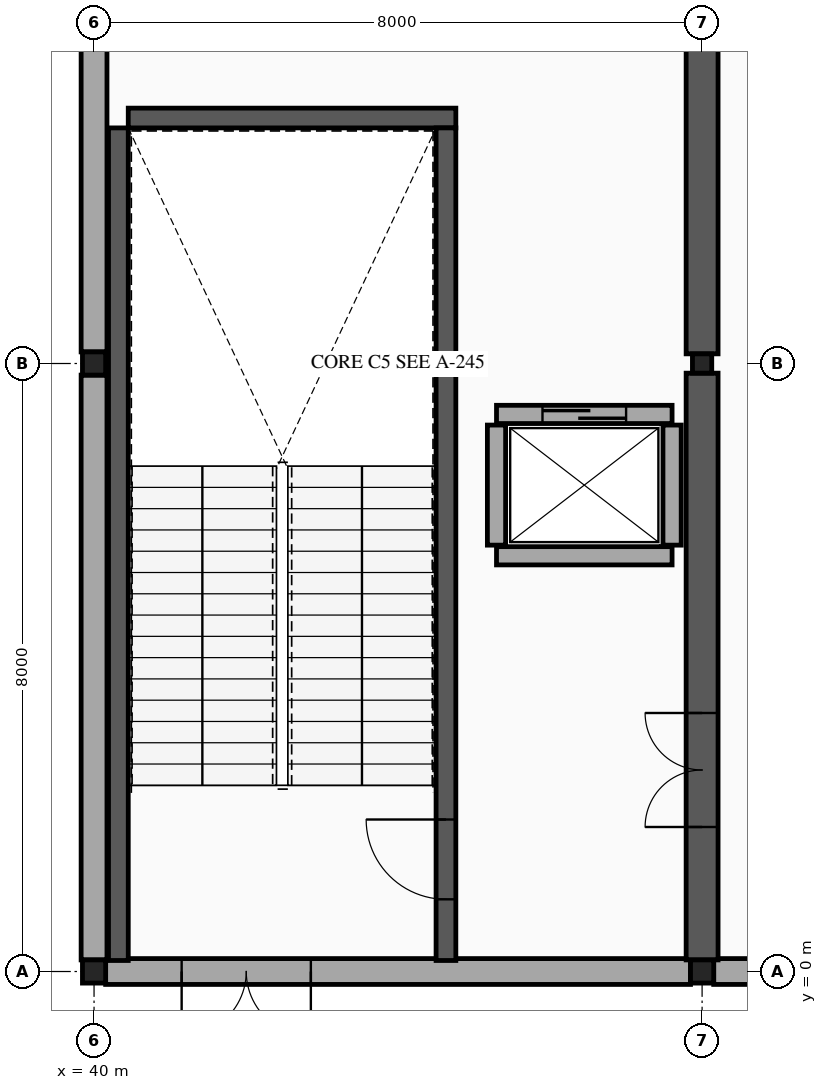
"""IFC4 building model, lengths in metres.
Left out: names, types, materials, properties, quantities, classifications, styles, units other than length and angle.
Written with IfcOpenShell. Run it as: python <this file> out.ifc"""

import sys

from ifc_helpers import new_model, si_unit, direction, frame, frame_2d, origin, origin_2d, place, context, subcontext, project, spatial, rectangle, hollow_rectangle, extrude, element, fill, save


model = new_model("IFC4")
c1 = context("Model", 3, precision=1e-05, world=origin(), true_north=direction((0.0, 1.0)))
c2 = subcontext(c1, "Body", "Model", "MODEL_VIEW")
j1 = project(units=[si_unit("LENGTHUNIT", "METRE"), si_unit("PLANEANGLEUNIT", "RADIAN")], contexts=[c1])
p1 = place(None, origin())
s1 = spatial("IfcSite", under=j1, at=p1, CompositionType="ELEMENT")
p2 = place(p1, origin())
s2 = spatial("IfcBuilding", under=s1, at=p2, CompositionType="ELEMENT")
p3 = place(p2, origin())
s3 = spatial("IfcBuildingStorey", under=s2, at=p3, CompositionType="ELEMENT", Elevation=0.0)
for number, where, z_axis, x_axis in (
    (1, (40.0, 0.0, 0.0), (0.0, 0.0, 1.0), (1.0, 0.0, 0.0)),
    (2, (40.0, 8.0, 0.0), (0.0, 0.0, 1.0), (1.0, 0.0, 0.0)),
    (3, (48.0, 0.0, 0.0), (0.0, 0.0, 1.0), (1.0, 0.0, 0.0)),
):
    element("IfcColumn", number, at=place(p3, frame(where, z_axis=z_axis, x_axis=x_axis)), inside=s3, PredefinedType="COLUMN", context=c2, shape_type="SweptSolid", body=[
        extrude(hollow_rectangle(XDim=0.305, YDim=0.305, WallThickness=0.012, InnerFilletRadius=0.012, OuterFilletRadius=0.024, at=origin_2d()), origin(), (0.0, 0.0, 1.0), 5.6),
    ])
p4 = place(p3, frame((48.0, 8.0, 0.0), z_axis=(0.0, 0.0, 1.0), x_axis=(1.0, 0.0, 0.0)))
e4 = element("IfcColumn", 4, at=p4, inside=s3, PredefinedType="COLUMN", context=c2, shape_type="SweptSolid", body=[
    extrude(hollow_rectangle(XDim=0.254, YDim=0.254, WallThickness=0.009, InnerFilletRadius=0.009, OuterFilletRadius=0.018, at=origin_2d()), origin(), (0.0, 0.0, 1.0), 5.6),
])
p5 = place(p3, frame((55.847, 0.0, 0.0), z_axis=(0.0, 0.0, 1.0), x_axis=(-1.0, 0.0, 0.0)))
e5 = element("IfcWall", 5, at=p5, inside=s3, PredefinedType="STANDARD", context=c2, shape_type="SweptSolid", body=[
    extrude(rectangle(XDim=7.695, YDim=0.34, at=frame_2d((3.847, 0.0))), origin(), (0.0, 0.0, 1.0), 4.58),
])
p6 = place(p3, frame((47.847, 0.0, 0.0), z_axis=(0.0, 0.0, 1.0), x_axis=(-1.0, 0.0, 0.0)))
e6 = element("IfcWall", 6, at=p6, inside=s3, PredefinedType="STANDARD", context=c2, shape_type="SweptSolid", body=[
    extrude(rectangle(XDim=7.695, YDim=0.34, at=frame_2d((3.847, 0.0))), origin(), (0.0, 0.0, 1.0), 4.58),
])
p7 = place(p6, frame((4.995, 0.0, 0.0)))
e7 = element("IfcOpeningElement", 7, at=p7, cuts=e6, PredefinedType="OPENING", context=c2, shape_type="SweptSolid", body=[
    extrude(rectangle(XDim=1.7, YDim=2.15, at=frame_2d((0.85, 1.075))), frame((0.0, 0.18, 0.0), z_axis=(0.0, -1.0, 0.0), x_axis=(1.0, 0.0, 0.0)), (0.0, 0.0, 1.0), 0.36),
])
for number, where, z_axis, x_axis in (
    (8, (40.0, 0.153, 0.0), (0.0, 0.0, 1.0), (0.0, 1.0, 0.0)),
    (9, (40.0, 8.153, 0.0), (0.0, 0.0, 1.0), (0.0, 1.0, 0.0)),
):
    element("IfcWall", number, at=place(p3, frame(where, z_axis=z_axis, x_axis=x_axis)), inside=s3, PredefinedType="STANDARD", context=c2, shape_type="SweptSolid", body=[
        extrude(rectangle(XDim=7.695, YDim=0.34, at=frame_2d((3.847, 0.0))), origin(), (0.0, 0.0, 1.0), 4.58),
    ])
p8 = place(p3, frame((40.45, 11.23, 0.0), z_axis=(0.0, 0.0, 1.0), x_axis=(1.0, 0.0, 0.0)))
e10 = element("IfcWall", 10, at=p8, inside=s3, PredefinedType="SHEAR", context=c2, shape_type="SweptSolid", body=[
    extrude(rectangle(XDim=4.31, YDim=0.26, at=frame_2d((2.155, 0.0))), origin(), (0.0, 0.0, 1.0), 5.38),
])
p9 = place(p3, frame((40.32, 0.145, 0.0), z_axis=(0.0, 0.0, 1.0), x_axis=(0.0, 1.0, 0.0)))
e11 = element("IfcWall", 11, at=p9, inside=s3, PredefinedType="SHEAR", context=c2, shape_type="SweptSolid", body=[
    extrude(rectangle(XDim=10.955, YDim=0.26, at=frame_2d((5.478, 0.0))), origin(), (0.0, 0.0, 1.0), 5.38),
])
p10 = place(p3, frame((44.63, 0.145, 0.0), z_axis=(0.0, 0.0, 1.0), x_axis=(0.0, 1.0, 0.0)))
e12 = element("IfcWall", 12, at=p10, inside=s3, PredefinedType="SHEAR", context=c2, shape_type="SweptSolid", body=[
    extrude(rectangle(XDim=10.955, YDim=0.26, at=frame_2d((5.478, 0.0))), origin(), (0.0, 0.0, 1.0), 5.38),
])
p11 = place(p10, frame((0.805, 0.0, 0.0)))
e13 = element("IfcOpeningElement", 13, at=p11, cuts=e12, PredefinedType="OPENING", context=c2, shape_type="SweptSolid", body=[
    extrude(rectangle(XDim=1.05, YDim=2.15, at=frame_2d((0.525, 1.075))), frame((0.0, 0.14, 0.0), z_axis=(0.0, -1.0, 0.0), x_axis=(1.0, 0.0, 0.0)), (0.0, 0.0, 1.0), 0.28),
])
p12 = place(p3, frame((48.0, 0.153, 0.0), z_axis=(0.0, 0.0, 1.0), x_axis=(0.0, 1.0, 0.0)))
e14 = element("IfcWall", 14, at=p12, inside=s3, PredefinedType="SHEAR", context=c2, shape_type="SweptSolid", body=[
    extrude(rectangle(XDim=7.72, YDim=0.42, at=frame_2d((3.86, 0.0))), origin(), (0.0, 0.0, 1.0), 5.38),
])
p13 = place(p12, frame((1.749, 0.0, 0.0)))
e15 = element("IfcOpeningElement", 15, at=p13, cuts=e14, PredefinedType="OPENING", context=c2, shape_type="SweptSolid", body=[
    extrude(rectangle(XDim=1.5, YDim=2.15, at=frame_2d((0.75, 1.075))), frame((0.0, 0.22, 0.0), z_axis=(0.0, -1.0, 0.0), x_axis=(1.0, 0.0, 0.0)), (0.0, 0.0, 1.0), 0.44),
])
p14 = place(p3, frame((48.0, 8.127, 0.0), z_axis=(0.0, 0.0, 1.0), x_axis=(0.0, 1.0, 0.0)))
e16 = element("IfcWall", 16, at=p14, inside=s3, PredefinedType="SHEAR", context=c2, shape_type="SweptSolid", body=[
    extrude(rectangle(XDim=7.746, YDim=0.42, at=frame_2d((3.873, 0.0))), origin(), (0.0, 0.0, 1.0), 5.38),
])
p15 = place(p14, frame((4.335, 0.0, 0.0)))
e17 = element("IfcOpeningElement", 17, at=p15, cuts=e16, PredefinedType="OPENING", context=c2, shape_type="SweptSolid", body=[
    extrude(rectangle(XDim=1.5, YDim=2.15, at=frame_2d((0.75, 1.075))), frame((0.0, 0.22, 0.0), z_axis=(0.0, -1.0, 0.0), x_axis=(1.0, 0.0, 0.0)), (0.0, 0.0, 1.0), 0.44),
])
p16 = place(p3, frame((45.295, 7.33, 0.0), z_axis=(0.0, 0.0, 1.0), x_axis=(1.0, 0.0, 0.0)))
e18 = element("IfcWall", 18, at=p16, inside=s3, PredefinedType="PARTITIONING", context=c2, shape_type="SweptSolid", body=[
    extrude(rectangle(XDim=2.31, YDim=0.24, at=frame_2d((1.155, 0.0))), origin(), (0.0, 0.0, 1.0), 5.38),
])
p17 = place(p16, frame((0.605, 0.0, 0.0)))
e19 = element("IfcOpeningElement", 19, at=p17, cuts=e18, PredefinedType="OPENING", context=c2, shape_type="SweptSolid", body=[
    extrude(rectangle(XDim=1.1, YDim=2.15, at=frame_2d((0.55, 1.075))), frame((0.0, 0.13, 0.0), z_axis=(0.0, -1.0, 0.0), x_axis=(1.0, 0.0, 0.0)), (0.0, 0.0, 1.0), 0.26),
])
p18 = place(p3, frame((45.295, 5.47, 0.0), z_axis=(0.0, 0.0, 1.0), x_axis=(1.0, 0.0, 0.0)))
e20 = element("IfcWall", 20, at=p18, inside=s3, PredefinedType="PARTITIONING", context=c2, shape_type="SweptSolid", body=[
    extrude(rectangle(XDim=2.31, YDim=0.24, at=frame_2d((1.155, 0.0))), origin(), (0.0, 0.0, 1.0), 5.38),
])
for number, where, z_axis, x_axis in (
    (21, (45.295, 5.61, 0.0), (0.0, 0.0, 1.0), (0.0, 1.0, 0.0)),
    (22, (47.605, 5.61, 0.0), (0.0, 0.0, 1.0), (0.0, 1.0, 0.0)),
):
    element("IfcWall", number, at=place(p3, frame(where, z_axis=z_axis, x_axis=x_axis)), inside=s3, PredefinedType="PARTITIONING", context=c2, shape_type="SweptSolid", body=[
        extrude(rectangle(XDim=1.58, YDim=0.24, at=frame_2d((0.79, 0.0))), origin(), (0.0, 0.0, 1.0), 5.38),
    ])
p19 = place(p7, origin())
e23 = element("IfcDoor", 23, at=p19, inside=s3, OperationType="DOUBLE_DOOR_SINGLE_SWING", PredefinedType="DOOR", context=c2, shape_type="SweptSolid", body=[
    extrude(rectangle(XDim=1.7, YDim=2.15, at=frame_2d((0.85, 1.075))), frame((0.0, 0.025, 0.0), z_axis=(0.0, -1.0, 0.0), x_axis=(1.0, 0.0, 0.0)), (0.0, 0.0, 1.0), 0.05),
])
fill(e7, e23)
p20 = place(p11, origin())
e24 = element("IfcDoor", 24, at=p20, inside=s3, OperationType="SINGLE_SWING_RIGHT", PredefinedType="DOOR", context=c2, shape_type="SweptSolid", body=[
    extrude(rectangle(XDim=1.05, YDim=2.15, at=frame_2d((0.525, 1.075))), frame((0.0, 0.025, 0.0), z_axis=(0.0, -1.0, 0.0), x_axis=(1.0, 0.0, 0.0)), (0.0, 0.0, 1.0), 0.05),
])
fill(e13, e24)
p21 = place(p13, origin())
e25 = element("IfcDoor", 25, at=p21, inside=s3, OperationType="DOUBLE_DOOR_SINGLE_SWING", PredefinedType="DOOR", context=c2, shape_type="SweptSolid", body=[
    extrude(rectangle(XDim=1.5, YDim=2.15, at=frame_2d((0.75, 1.075))), frame((0.0, 0.025, 0.0), z_axis=(0.0, -1.0, 0.0), x_axis=(1.0, 0.0, 0.0)), (0.0, 0.0, 1.0), 0.05),
])
fill(e15, e25)
p22 = place(p17, origin())
e26 = element("IfcDoor", 26, at=p22, inside=s3, OperationType="SLIDING_TO_LEFT", PredefinedType="DOOR", context=c2, shape_type="SweptSolid", body=[
    extrude(rectangle(XDim=1.1, YDim=2.15, at=frame_2d((0.55, 1.075))), frame((0.0, 0.025, 0.0), z_axis=(0.0, -1.0, 0.0), x_axis=(1.0, 0.0, 0.0)), (0.0, 0.0, 1.0), 0.05),
])
fill(e19, e26)
save(model, sys.argv[1])
